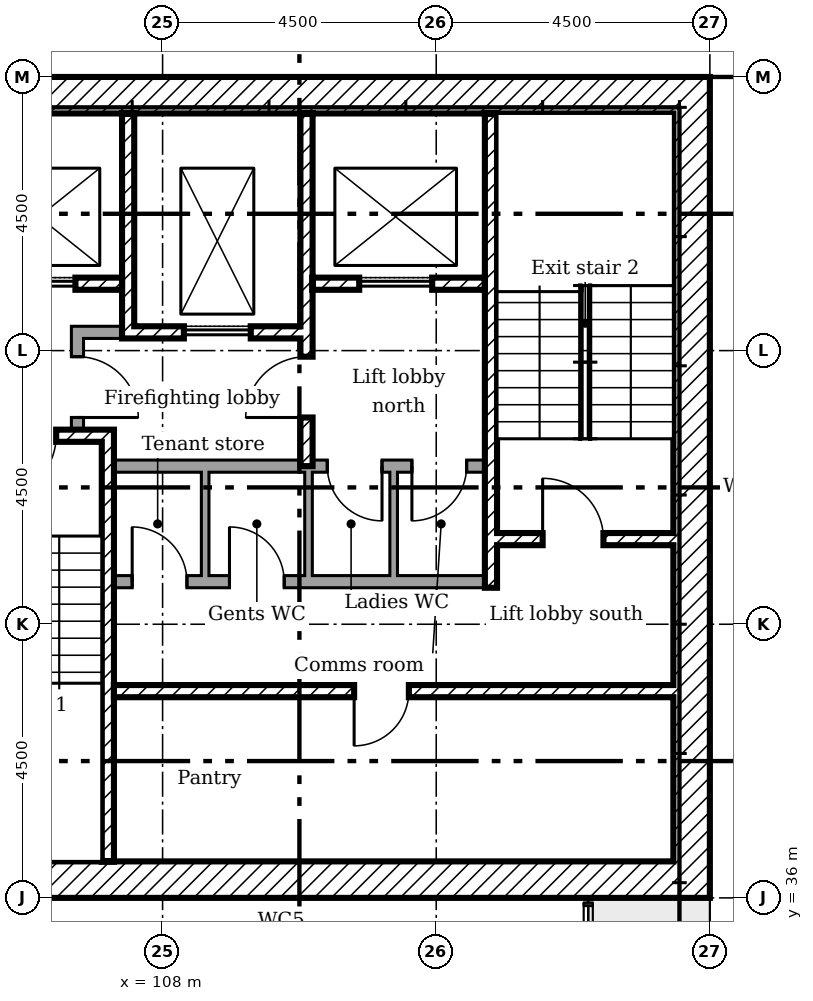
"""IFC4 building model, lengths in metres.
Left out: names, types, materials, properties, quantities, classifications, styles, units other than length and angle.
Written with IfcOpenShell. Run it as: python <this file> out.ifc"""

import sys

from ifc_helpers import new_model, si_unit, direction, frame, frame_2d, origin, place, context, subcontext, project, spatial, rectangle, extrude, element, fill, save


model = new_model("IFC4")
c1 = context("Model", 3, precision=1e-05, world=origin(), true_north=direction((0.0, 1.0)))
c2 = subcontext(c1, "Body", "Model", "MODEL_VIEW")
j1 = project(units=[si_unit("LENGTHUNIT", "METRE"), si_unit("PLANEANGLEUNIT", "RADIAN")], contexts=[c1])
p1 = place(None, origin())
s1 = spatial("IfcSite", under=j1, at=p1, CompositionType="ELEMENT")
p2 = place(p1, origin())
s2 = spatial("IfcBuilding", under=s1, at=p2, CompositionType="ELEMENT")
p3 = place(p2, frame((0.0, 0.0, 172.6)))
s3 = spatial("IfcBuildingStorey", under=s2, at=p3, CompositionType="ELEMENT", Elevation=172.6)
p4 = place(p3, frame((116.7, 36.0, 0.0), z_axis=(0.0, 0.0, 1.0), x_axis=(0.0, 1.0, 0.0)))
e1 = element("IfcWall", 1, at=p4, inside=s3, PredefinedType="SHEAR", context=c2, shape_type="SweptSolid", body=[
    extrude(rectangle(XDim=13.5, YDim=0.6, at=frame_2d((6.75, 0.0))), origin(), (0.0, 0.0, 1.0), 3.35),
])
for number, where in (
    (2, (103.5, 49.2, 0.0)),
    (3, (103.5, 36.3, 0.0)),
):
    element("IfcWall", number, at=place(p3, frame(where)), inside=s3, PredefinedType="SHEAR", context=c2, shape_type="SweptSolid", body=[
        extrude(rectangle(XDim=12.9, YDim=0.6, at=frame_2d((6.45, 0.0))), origin(), (0.0, 0.0, 1.0), 3.35),
    ])
p5 = place(p3, frame((107.433, 48.9, 0.0), z_axis=(0.0, 0.0, 1.0), x_axis=(0.0, -1.0, 0.0)))
e4 = element("IfcWall", 4, at=p5, inside=s3, PredefinedType="SHEAR", context=c2, shape_type="SweptSolid", body=[
    extrude(rectangle(XDim=3.7, YDim=0.2, at=frame_2d((1.85, 0.0))), origin(), (0.0, 0.0, 1.0), 3.35),
])
p6 = place(p3, frame((110.367, 48.9, 0.0), z_axis=(0.0, 0.0, 1.0), x_axis=(0.0, -1.0, 0.0)))
e5 = element("IfcWall", 5, at=p6, inside=s3, PredefinedType="SHEAR", context=c2, shape_type="SweptSolid", body=[
    extrude(rectangle(XDim=5.8, YDim=0.2, at=frame_2d((2.9, 0.0))), origin(), (0.0, 0.0, 1.0), 3.35),
])
p7 = place(p6, frame((4.0, 0.0, 0.0)))
e6 = element("IfcOpeningElement", 6, at=p7, cuts=e5, PredefinedType="OPENING", context=c2, shape_type="SweptSolid", body=[
    extrude(rectangle(XDim=1.0, YDim=2.1, at=frame_2d((0.5, 1.05))), frame((0.0, 0.11, 0.0), z_axis=(0.0, -1.0, 0.0), x_axis=(1.0, 0.0, 0.0)), (0.0, 0.0, 1.0), 0.22),
])
p8 = place(p3, frame((106.5, 45.3, 0.0)))
e7 = element("IfcWall", 7, at=p8, inside=s3, PredefinedType="PARTITIONING", context=c2, shape_type="SweptSolid", body=[
    extrude(rectangle(XDim=0.833, YDim=0.2, at=frame_2d((0.417, 0.0))), origin(), (0.0, 0.0, 1.0), 3.35),
])
p9 = place(p3, frame((106.6, 43.7, 0.0), z_axis=(0.0, 0.0, 1.0), x_axis=(0.0, 1.0, 0.0)))
e8 = element("IfcWall", 8, at=p9, inside=s3, PredefinedType="PARTITIONING", context=c2, shape_type="SweptSolid", body=[
    extrude(rectangle(XDim=1.5, YDim=0.2, at=frame_2d((0.75, 0.0))), origin(), (0.0, 0.0, 1.0), 3.35),
])
p10 = place(p9, frame((0.2, 0.0, 0.0)))
e9 = element("IfcOpeningElement", 9, at=p10, cuts=e8, PredefinedType="OPENING", context=c2, shape_type="SweptSolid", body=[
    extrude(rectangle(XDim=1.0, YDim=2.1, at=frame_2d((0.5, 1.05))), frame((0.0, 0.11, 0.0), z_axis=(0.0, -1.0, 0.0), x_axis=(1.0, 0.0, 0.0)), (0.0, 0.0, 1.0), 0.22),
])
p11 = place(p3, frame((104.1, 46.1, 0.0)))
e10 = element("IfcWall", 10, at=p11, inside=s3, PredefinedType="SHEAR", context=c2, shape_type="SweptSolid", body=[
    extrude(rectangle(XDim=3.233, YDim=0.2, at=frame_2d((1.617, 0.0))), origin(), (0.0, 0.0, 1.0), 3.35),
])
p12 = place(p11, frame((1.267, 0.0, 0.0)))
e11 = element("IfcOpeningElement", 11, at=p12, cuts=e10, PredefinedType="OPENING", context=c2, shape_type="SweptSolid", body=[
    extrude(rectangle(XDim=1.2, YDim=2.1, at=frame_2d((0.6, 1.05))), frame((0.0, 0.11, 0.0), z_axis=(0.0, -1.0, 0.0), x_axis=(1.0, 0.0, 0.0)), (0.0, 0.0, 1.0), 0.22),
])
p13 = place(p3, frame((110.467, 46.1, 0.0)))
e12 = element("IfcWall", 12, at=p13, inside=s3, PredefinedType="SHEAR", context=c2, shape_type="SweptSolid", body=[
    extrude(rectangle(XDim=2.833, YDim=0.2, at=frame_2d((1.417, 0.0))), origin(), (0.0, 0.0, 1.0), 3.35),
])
p14 = place(p13, frame((0.767, 0.0, 0.0)))
e13 = element("IfcOpeningElement", 13, at=p14, cuts=e12, PredefinedType="OPENING", context=c2, shape_type="SweptSolid", body=[
    extrude(rectangle(XDim=1.2, YDim=2.1, at=frame_2d((0.6, 1.05))), frame((0.0, 0.11, 0.0), z_axis=(0.0, -1.0, 0.0), x_axis=(1.0, 0.0, 0.0)), (0.0, 0.0, 1.0), 0.22),
])
p15 = place(p3, frame((107.533, 45.3, 0.0)))
e14 = element("IfcWall", 14, at=p15, inside=s3, PredefinedType="SHEAR", context=c2, shape_type="SweptSolid", body=[
    extrude(rectangle(XDim=2.733, YDim=0.2, at=frame_2d((1.367, 0.0))), origin(), (0.0, 0.0, 1.0), 3.35),
])
p16 = place(p15, frame((0.817, 0.0, 0.0)))
e15 = element("IfcOpeningElement", 15, at=p16, cuts=e14, PredefinedType="OPENING", context=c2, shape_type="SweptSolid", body=[
    extrude(rectangle(XDim=1.1, YDim=2.1, at=frame_2d((0.55, 1.05))), frame((0.0, 0.11, 0.0), z_axis=(0.0, -1.0, 0.0), x_axis=(1.0, 0.0, 0.0)), (0.0, 0.0, 1.0), 0.22),
])
p17 = place(p3, frame((107.2, 39.4, 0.0)))
e16 = element("IfcWall", 16, at=p17, inside=s3, PredefinedType="SHEAR", context=c2, shape_type="SweptSolid", body=[
    extrude(rectangle(XDim=9.2, YDim=0.2, at=frame_2d((4.6, 0.0))), origin(), (0.0, 0.0, 1.0), 3.35),
])
p18 = place(p17, frame((3.95, 0.0, 0.0)))
e17 = element("IfcOpeningElement", 17, at=p18, cuts=e16, PredefinedType="OPENING", context=c2, shape_type="SweptSolid", body=[
    extrude(rectangle(XDim=0.9, YDim=2.1, at=frame_2d((0.45, 1.05))), frame((0.0, 0.11, 0.0), z_axis=(0.0, -1.0, 0.0), x_axis=(1.0, 0.0, 0.0)), (0.0, 0.0, 1.0), 0.22),
])
p19 = place(p3, frame((107.1, 36.6, 0.0), z_axis=(0.0, 0.0, 1.0), x_axis=(0.0, 1.0, 0.0)))
e18 = element("IfcWall", 18, at=p19, inside=s3, PredefinedType="SHEAR", context=c2, shape_type="SweptSolid", body=[
    extrude(rectangle(XDim=7.1, YDim=0.2, at=frame_2d((3.55, 0.0))), origin(), (0.0, 0.0, 1.0), 3.35),
])
p20 = place(p3, frame((104.1, 43.6, 0.0)))
e19 = element("IfcWall", 19, at=p20, inside=s3, PredefinedType="SHEAR", context=c2, shape_type="SweptSolid", body=[
    extrude(rectangle(XDim=2.9, YDim=0.2, at=frame_2d((1.45, 0.0))), origin(), (0.0, 0.0, 1.0), 3.35),
])
p21 = place(p20, frame((1.15, 0.0, 0.0)))
e20 = element("IfcOpeningElement", 20, at=p21, cuts=e19, PredefinedType="OPENING", context=c2, shape_type="SweptSolid", body=[
    extrude(rectangle(XDim=1.0, YDim=2.1, at=frame_2d((0.5, 1.05))), frame((0.0, 0.11, 0.0), z_axis=(0.0, -1.0, 0.0), x_axis=(1.0, 0.0, 0.0)), (0.0, 0.0, 1.0), 0.22),
])
p22 = place(p3, frame((113.5, 41.9, 0.0)))
e21 = element("IfcWall", 21, at=p22, inside=s3, PredefinedType="SHEAR", context=c2, shape_type="SweptSolid", body=[
    extrude(rectangle(XDim=2.9, YDim=0.2, at=frame_2d((1.45, 0.0))), origin(), (0.0, 0.0, 1.0), 3.35),
])
p23 = place(p22, frame((0.75, 0.0, 0.0)))
e22 = element("IfcOpeningElement", 22, at=p23, cuts=e21, PredefinedType="OPENING", context=c2, shape_type="SweptSolid", body=[
    extrude(rectangle(XDim=1.0, YDim=2.1, at=frame_2d((0.5, 1.05))), frame((0.0, 0.11, 0.0), z_axis=(0.0, -1.0, 0.0), x_axis=(1.0, 0.0, 0.0)), (0.0, 0.0, 1.0), 0.22),
])
p24 = place(p3, frame((113.4, 41.1, 0.0), z_axis=(0.0, 0.0, 1.0), x_axis=(0.0, 1.0, 0.0)))
e23 = element("IfcWall", 23, at=p24, inside=s3, PredefinedType="SHEAR", context=c2, shape_type="SweptSolid", body=[
    extrude(rectangle(XDim=7.8, YDim=0.2, at=frame_2d((3.9, 0.0))), origin(), (0.0, 0.0, 1.0), 3.35),
])
p25 = place(p3, frame((107.2, 43.1, 0.0)))
e24 = element("IfcWall", 24, at=p25, inside=s3, PredefinedType="PARTITIONING", context=c2, shape_type="SweptSolid", body=[
    extrude(rectangle(XDim=6.1, YDim=0.2, at=frame_2d((3.05, 0.0))), origin(), (0.0, 0.0, 1.0), 3.35),
])
p26 = place(p25, frame((3.509, 0.0, 0.0)))
e25 = element("IfcOpeningElement", 25, at=p26, cuts=e24, PredefinedType="OPENING", context=c2, shape_type="SweptSolid", body=[
    extrude(rectangle(XDim=0.9, YDim=2.1, at=frame_2d((0.45, 1.05))), frame((0.0, 0.11, 0.0), z_axis=(0.0, -1.0, 0.0), x_axis=(1.0, 0.0, 0.0)), (0.0, 0.0, 1.0), 0.22),
])
p27 = place(p25, frame((4.9, 0.0, 0.0)))
e26 = element("IfcOpeningElement", 26, at=p27, cuts=e24, PredefinedType="OPENING", context=c2, shape_type="SweptSolid", body=[
    extrude(rectangle(XDim=0.9, YDim=2.1, at=frame_2d((0.45, 1.05))), frame((0.0, 0.11, 0.0), z_axis=(0.0, -1.0, 0.0), x_axis=(1.0, 0.0, 0.0)), (0.0, 0.0, 1.0), 0.22),
])
p28 = place(p3, frame((107.2, 41.2, 0.0)))
e27 = element("IfcWall", 27, at=p28, inside=s3, PredefinedType="PARTITIONING", context=c2, shape_type="SweptSolid", body=[
    extrude(rectangle(XDim=6.1, YDim=0.2, at=frame_2d((3.05, 0.0))), origin(), (0.0, 0.0, 1.0), 3.35),
])
p29 = place(p28, frame((0.3, 0.0, 0.0)))
e28 = element("IfcOpeningElement", 28, at=p29, cuts=e27, PredefinedType="OPENING", context=c2, shape_type="SweptSolid", body=[
    extrude(rectangle(XDim=0.9, YDim=2.1, at=frame_2d((0.45, 1.05))), frame((0.0, 0.11, 0.0), z_axis=(0.0, -1.0, 0.0), x_axis=(1.0, 0.0, 0.0)), (0.0, 0.0, 1.0), 0.22),
])
p30 = place(p28, frame((1.9, 0.0, 0.0)))
e29 = element("IfcOpeningElement", 29, at=p30, cuts=e27, PredefinedType="OPENING", context=c2, shape_type="SweptSolid", body=[
    extrude(rectangle(XDim=0.9, YDim=2.1, at=frame_2d((0.45, 1.05))), frame((0.0, 0.11, 0.0), z_axis=(0.0, -1.0, 0.0), x_axis=(1.0, 0.0, 0.0)), (0.0, 0.0, 1.0), 0.22),
])
for number, where, z_axis, x_axis in (
    (30, (108.7, 41.3, 0.0), (0.0, 0.0, 1.0), (0.0, 1.0, 0.0)),
    (31, (110.4, 41.3, 0.0), (0.0, 0.0, 1.0), (0.0, 1.0, 0.0)),
    (32, (111.8, 41.3, 0.0), (0.0, 0.0, 1.0), (0.0, 1.0, 0.0)),
):
    element("IfcWall", number, at=place(p3, frame(where, z_axis=z_axis, x_axis=x_axis)), inside=s3, PredefinedType="PARTITIONING", context=c2, shape_type="SweptSolid", body=[
        extrude(rectangle(XDim=1.7, YDim=0.125, at=frame_2d((0.85, 0.0))), origin(), (0.0, 0.0, 1.0), 3.35),
    ])
p31 = place(p21, frame((1.0, 0.0, 0.0), x_axis=(-1.0, 0.0, 0.0)))
e33 = element("IfcDoor", 33, at=p31, inside=s3, OperationType="SINGLE_SWING_LEFT", PredefinedType="DOOR", context=c2, shape_type="SweptSolid", body=[
    extrude(rectangle(XDim=1.0, YDim=2.1, at=frame_2d((0.5, 1.05))), frame((0.0, 0.025, 0.0), z_axis=(0.0, -1.0, 0.0), x_axis=(1.0, 0.0, 0.0)), (0.0, 0.0, 1.0), 0.05),
])
fill(e20, e33)
p32 = place(p23, origin())
e34 = element("IfcDoor", 34, at=p32, inside=s3, OperationType="SINGLE_SWING_RIGHT", PredefinedType="DOOR", context=c2, shape_type="SweptSolid", body=[
    extrude(rectangle(XDim=1.0, YDim=2.1, at=frame_2d((0.5, 1.05))), frame((0.0, 0.025, 0.0), z_axis=(0.0, -1.0, 0.0), x_axis=(1.0, 0.0, 0.0)), (0.0, 0.0, 1.0), 0.05),
])
fill(e22, e34)
p33 = place(p7, frame((1.0, 0.0, 0.0), x_axis=(-1.0, 0.0, 0.0)))
e35 = element("IfcDoor", 35, at=p33, inside=s3, OperationType="SINGLE_SWING_RIGHT", PredefinedType="DOOR", context=c2, shape_type="SweptSolid", body=[
    extrude(rectangle(XDim=1.0, YDim=2.1, at=frame_2d((0.5, 1.05))), frame((0.0, 0.025, 0.0), z_axis=(0.0, -1.0, 0.0), x_axis=(1.0, 0.0, 0.0)), (0.0, 0.0, 1.0), 0.05),
])
fill(e6, e35)
p34 = place(p10, frame((1.0, 0.0, 0.0), x_axis=(-1.0, 0.0, 0.0)))
e36 = element("IfcDoor", 36, at=p34, inside=s3, OperationType="SINGLE_SWING_LEFT", PredefinedType="DOOR", context=c2, shape_type="SweptSolid", body=[
    extrude(rectangle(XDim=1.0, YDim=2.1, at=frame_2d((0.5, 1.05))), frame((0.0, 0.025, 0.0), z_axis=(0.0, -1.0, 0.0), x_axis=(1.0, 0.0, 0.0)), (0.0, 0.0, 1.0), 0.05),
])
fill(e9, e36)
p35 = place(p18, frame((0.9, 0.0, 0.0), x_axis=(-1.0, 0.0, 0.0)))
e37 = element("IfcDoor", 37, at=p35, inside=s3, OperationType="SINGLE_SWING_LEFT", PredefinedType="DOOR", context=c2, shape_type="SweptSolid", body=[
    extrude(rectangle(XDim=0.9, YDim=2.1, at=frame_2d((0.45, 1.05))), frame((0.0, 0.025, 0.0), z_axis=(0.0, -1.0, 0.0), x_axis=(1.0, 0.0, 0.0)), (0.0, 0.0, 1.0), 0.05),
])
fill(e17, e37)
p36 = place(p29, origin())
e38 = element("IfcDoor", 38, at=p36, inside=s3, OperationType="SINGLE_SWING_RIGHT", PredefinedType="DOOR", context=c2, shape_type="SweptSolid", body=[
    extrude(rectangle(XDim=0.9, YDim=2.1, at=frame_2d((0.45, 1.05))), frame((0.0, 0.025, 0.0), z_axis=(0.0, -1.0, 0.0), x_axis=(1.0, 0.0, 0.0)), (0.0, 0.0, 1.0), 0.05),
])
fill(e28, e38)
p37 = place(p30, origin())
e39 = element("IfcDoor", 39, at=p37, inside=s3, OperationType="SINGLE_SWING_RIGHT", PredefinedType="DOOR", context=c2, shape_type="SweptSolid", body=[
    extrude(rectangle(XDim=0.9, YDim=2.1, at=frame_2d((0.45, 1.05))), frame((0.0, 0.025, 0.0), z_axis=(0.0, -1.0, 0.0), x_axis=(1.0, 0.0, 0.0)), (0.0, 0.0, 1.0), 0.05),
])
fill(e29, e39)
p38 = place(p26, frame((0.9, 0.0, 0.0), x_axis=(-1.0, 0.0, 0.0)))
e40 = element("IfcDoor", 40, at=p38, inside=s3, OperationType="SINGLE_SWING_RIGHT", PredefinedType="DOOR", context=c2, shape_type="SweptSolid", body=[
    extrude(rectangle(XDim=0.9, YDim=2.1, at=frame_2d((0.45, 1.05))), frame((0.0, 0.025, 0.0), z_axis=(0.0, -1.0, 0.0), x_axis=(1.0, 0.0, 0.0)), (0.0, 0.0, 1.0), 0.05),
])
fill(e25, e40)
p39 = place(p27, frame((0.9, 0.0, 0.0), x_axis=(-1.0, 0.0, 0.0)))
e41 = element("IfcDoor", 41, at=p39, inside=s3, OperationType="SINGLE_SWING_LEFT", PredefinedType="DOOR", context=c2, shape_type="SweptSolid", body=[
    extrude(rectangle(XDim=0.9, YDim=2.1, at=frame_2d((0.45, 1.05))), frame((0.0, 0.025, 0.0), z_axis=(0.0, -1.0, 0.0), x_axis=(1.0, 0.0, 0.0)), (0.0, 0.0, 1.0), 0.05),
])
fill(e26, e41)
p40 = place(p16, origin())
e42 = element("IfcDoor", 42, at=p40, inside=s3, OperationType="SLIDING_TO_LEFT", PredefinedType="DOOR", context=c2, shape_type="SweptSolid", body=[
    extrude(rectangle(XDim=1.1, YDim=2.1, at=frame_2d((0.55, 1.05))), frame((0.0, 0.025, 0.0), z_axis=(0.0, -1.0, 0.0), x_axis=(1.0, 0.0, 0.0)), (0.0, 0.0, 1.0), 0.05),
])
fill(e15, e42)
p41 = place(p12, origin())
e43 = element("IfcDoor", 43, at=p41, inside=s3, OperationType="SLIDING_TO_LEFT", PredefinedType="DOOR", context=c2, shape_type="SweptSolid", body=[
    extrude(rectangle(XDim=1.2, YDim=2.1, at=frame_2d((0.6, 1.05))), frame((0.0, 0.025, 0.0), z_axis=(0.0, -1.0, 0.0), x_axis=(1.0, 0.0, 0.0)), (0.0, 0.0, 1.0), 0.05),
])
fill(e11, e43)
p42 = place(p14, origin())
e44 = element("IfcDoor", 44, at=p42, inside=s3, OperationType="SLIDING_TO_LEFT", PredefinedType="DOOR", context=c2, shape_type="SweptSolid", body=[
    extrude(rectangle(XDim=1.2, YDim=2.1, at=frame_2d((0.6, 1.05))), frame((0.0, 0.025, 0.0), z_axis=(0.0, -1.0, 0.0), x_axis=(1.0, 0.0, 0.0)), (0.0, 0.0, 1.0), 0.05),
])
fill(e13, e44)
save(model, sys.argv[1])
